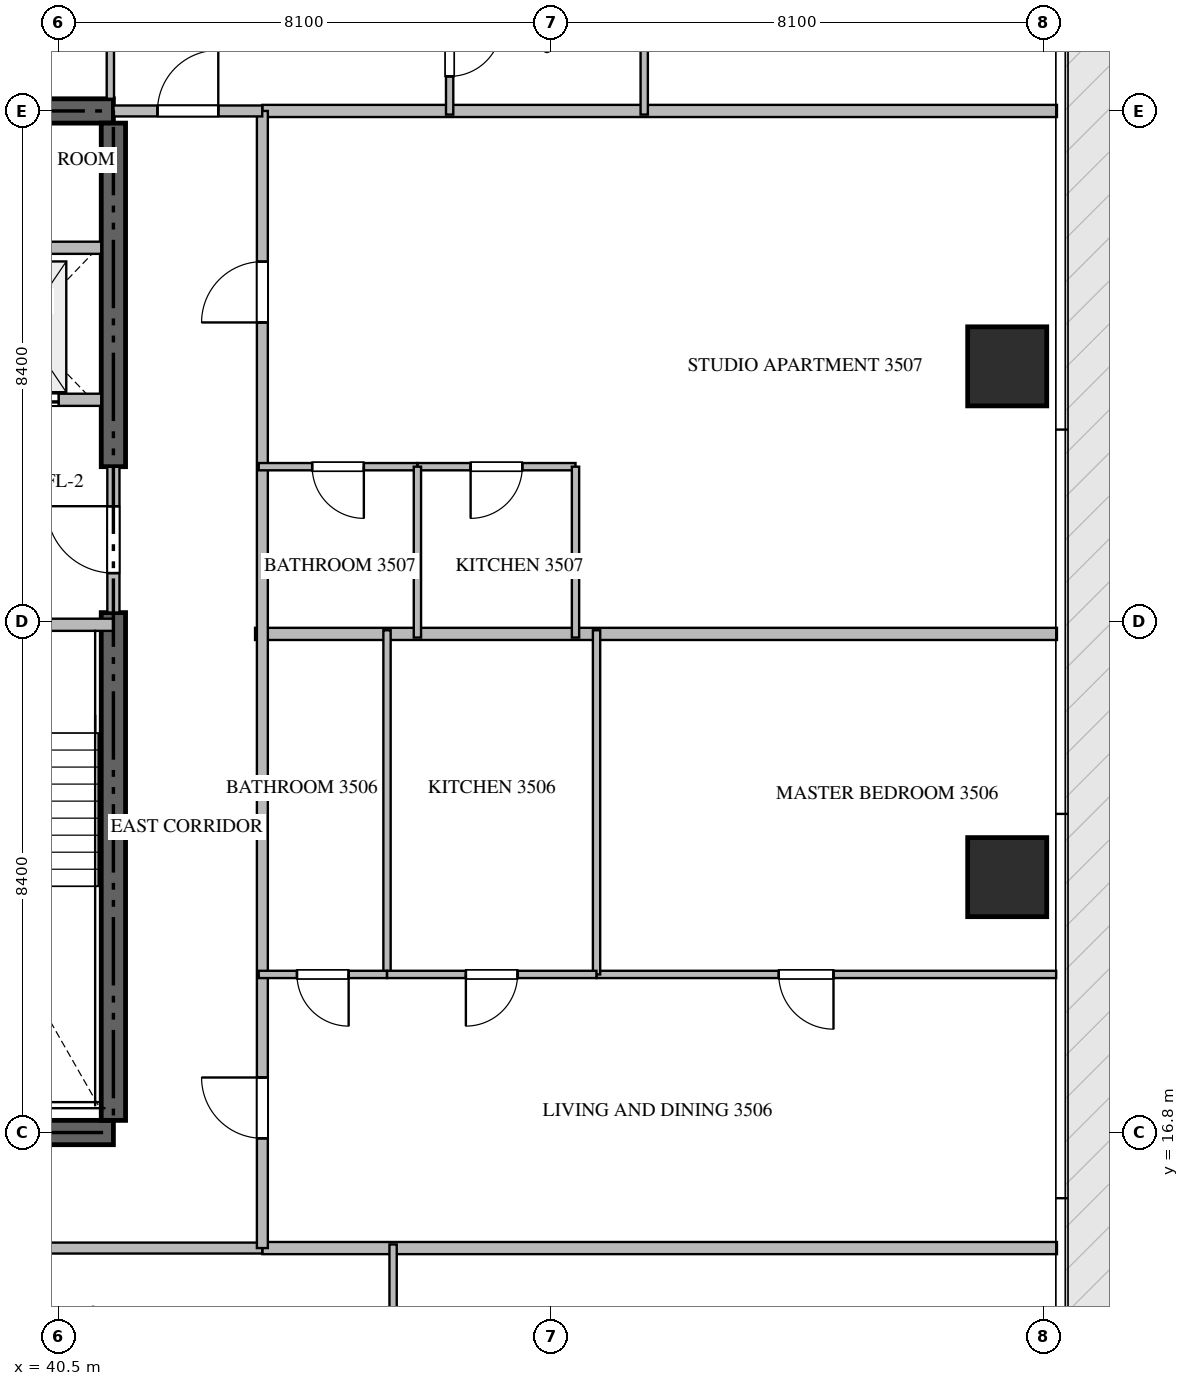
"""IFC4 building model, lengths in metres.
Left out: names, types, materials, properties, quantities, classifications, styles, units other than length and angle.
Written with IfcOpenShell. Run it as: python <this file> out.ifc"""

import sys

from ifc_helpers import new_model, si_unit, direction, frame, frame_2d, origin, origin_2d, place, context, subcontext, project, spatial, rectangle, extrude, source, transform, mapped, element, fill, save


model = new_model("IFC4")
c1 = context("Model", 3, precision=1e-05, world=origin(), true_north=direction((0.0, 1.0)))
c2 = subcontext(c1, "Body", "Model", "MODEL_VIEW")
j1 = project(units=[si_unit("LENGTHUNIT", "METRE"), si_unit("PLANEANGLEUNIT", "RADIAN")], contexts=[c1])
p1 = place(None, origin())
s1 = spatial("IfcSite", under=j1, at=p1, CompositionType="ELEMENT")
p2 = place(p1, origin())
s2 = spatial("IfcBuilding", under=s1, at=p2, CompositionType="ELEMENT")
p3 = place(p2, frame((0.0, 0.0, 142.65)))
s3 = spatial("IfcBuildingStorey", under=s2, at=p3, CompositionType="ELEMENT", Elevation=142.65)
for number, where, z_axis, x_axis in (
    (1, (23.4, 16.8, -0.26), (0.0, 0.0, 1.0), (1.0, 0.0, 0.0)),
    (2, (41.4, 33.6, -0.26), (0.0, 0.0, 1.0), (-1.0, 0.0, 0.0)),
):
    element("IfcWall", number, at=place(p3, frame(where, z_axis=z_axis, x_axis=x_axis)), inside=s3, PredefinedType="SHEAR", context=c2, shape_type="SweptSolid", body=[
        extrude(rectangle(XDim=18.0, YDim=0.4, at=frame_2d((9.0, 0.0))), origin(), (0.0, 0.0, 1.0), 3.748),
    ])
p4 = place(p3, frame((41.4, 17.0, -0.26), z_axis=(0.0, 0.0, 1.0), x_axis=(0.0, 1.0, 0.0)))
e3 = element("IfcWall", 3, at=p4, inside=s3, PredefinedType="SHEAR", context=c2, shape_type="SweptSolid", body=[
    extrude(rectangle(XDim=8.35, YDim=0.4, at=frame_2d((4.175, 0.0))), origin(), (0.0, 0.0, 1.0), 3.748),
])
p5 = place(p3, frame((41.4, 27.75, -0.26), z_axis=(0.0, 0.0, 1.0), x_axis=(0.0, 1.0, 0.0)))
e4 = element("IfcWall", 4, at=p5, inside=s3, PredefinedType="SHEAR", context=c2, shape_type="SweptSolid", body=[
    extrude(rectangle(XDim=5.65, YDim=0.4, at=frame_2d((2.825, 0.0))), origin(), (0.0, 0.0, 1.0), 3.748),
])
m1 = source(origin(), c2, "Body", "SweptSolid", [
    extrude(rectangle(XDim=1.3, YDim=1.3, at=origin_2d()), origin(), (0.0, 0.0, 1.0), 3.75),
])
for number, where, z_axis, x_axis in (
    (5, (56.1, 21.0, -0.26), (0.0, 0.0, 1.0), (1.0, 0.0, 0.0)),
    (6, (56.1, 29.4, -0.26), (0.0, 0.0, 1.0), (1.0, 0.0, 0.0)),
):
    element("IfcColumn", number, at=place(p3, frame(where, z_axis=z_axis, x_axis=x_axis)), inside=s3, PredefinedType="COLUMN", context=c2, shape_type="MappedRepresentation", body=[
        mapped(m1, transform((0.0, 0.0, 0.0), scale=1.0)),
    ])
p6 = place(p3, frame((36.95, 25.15, 0.0), z_axis=(0.0, 0.0, 1.0), x_axis=(1.0, 0.0, 0.0)))
e7 = element("IfcWall", 7, at=p6, inside=s3, PredefinedType="STANDARD", context=c2, shape_type="SweptSolid", body=[
    extrude(rectangle(XDim=4.45, YDim=0.2, at=frame_2d((2.225, 0.0))), origin(), (0.0, 0.0, 1.0), 3.49),
])
p7 = place(p6, frame((1.65, 0.0, 0.0)))
e8 = element("IfcOpeningElement", 8, at=p7, cuts=e7, PredefinedType="OPENING", context=c2, shape_type="SweptSolid", body=[
    extrude(rectangle(XDim=1.1, YDim=2.15, at=frame_2d((0.55, 1.075))), frame((0.0, 0.11, 0.0), z_axis=(0.0, -1.0, 0.0), x_axis=(1.0, 0.0, 0.0)), (0.0, 0.0, 1.0), 0.22),
])
p8 = place(p3, frame((38.75, 28.85, 0.0), z_axis=(0.0, 0.0, 1.0), x_axis=(1.0, 0.0, 0.0)))
e9 = element("IfcWall", 9, at=p8, inside=s3, PredefinedType="STANDARD", context=c2, shape_type="SweptSolid", body=[
    extrude(rectangle(XDim=2.45, YDim=0.2, at=frame_2d((1.225, 0.0))), origin(), (0.0, 0.0, 1.0), 3.49),
])
p9 = place(p8, frame((0.55, 0.0, 0.0)))
e10 = element("IfcOpeningElement", 10, at=p9, cuts=e9, PredefinedType="OPENING", context=c2, shape_type="SweptSolid", body=[
    extrude(rectangle(XDim=1.2, YDim=2.2, at=frame_2d((0.6, 1.1))), frame((0.0, 0.11, 0.0), z_axis=(0.0, -1.0, 0.0), x_axis=(1.0, 0.0, 0.0)), (0.0, 0.0, 1.0), 0.22),
])
p10 = place(p3, frame((38.75, 31.35, 0.0), z_axis=(0.0, 0.0, 1.0), x_axis=(1.0, 0.0, 0.0)))
e11 = element("IfcWall", 11, at=p10, inside=s3, PredefinedType="STANDARD", context=c2, shape_type="SweptSolid", body=[
    extrude(rectangle(XDim=2.45, YDim=0.2, at=frame_2d((1.225, 0.0))), origin(), (0.0, 0.0, 1.0), 3.49),
])
p11 = place(p3, frame((41.4, 25.352, 0.0), z_axis=(0.0, 0.0, 1.0), x_axis=(0.0, 1.0, 0.0)))
e12 = element("IfcWall", 12, at=p11, inside=s3, PredefinedType="STANDARD", context=c2, shape_type="SweptSolid", body=[
    extrude(rectangle(XDim=2.396, YDim=0.2, at=frame_2d((1.198, 0.0))), origin(), (0.0, 0.0, 1.0), 3.49),
])
p12 = place(p11, frame((0.648, 0.0, 0.0)))
e13 = element("IfcOpeningElement", 13, at=p12, cuts=e12, PredefinedType="OPENING", context=c2, shape_type="SweptSolid", body=[
    extrude(rectangle(XDim=1.1, YDim=2.15, at=frame_2d((0.55, 1.075))), frame((0.0, 0.11, 0.0), z_axis=(0.0, -1.0, 0.0), x_axis=(1.0, 0.0, 0.0)), (0.0, 0.0, 1.0), 0.22),
])
p13 = place(p3, frame((43.73, 25.0, 0.0), z_axis=(0.0, 0.0, 1.0), x_axis=(1.0, 0.0, 0.0)))
e14 = element("IfcWall", 14, at=p13, inside=s3, PredefinedType="PARTITIONING", context=c2, shape_type="SweptSolid", body=[
    extrude(rectangle(XDim=13.188, YDim=0.2, at=frame_2d((6.594, 0.0))), origin(), (0.0, 0.0, 1.0), 3.49),
])
for number, where, z_axis, x_axis in (
    (15, (43.85, 14.9, 0.0), (0.0, 0.0, 1.0), (1.0, 0.0, 0.0)),
    (16, (43.85, 33.6, 0.0), (0.0, 0.0, 1.0), (1.0, 0.0, 0.0)),
):
    element("IfcWall", number, at=place(p3, frame(where, z_axis=z_axis, x_axis=x_axis)), inside=s3, PredefinedType="PARTITIONING", context=c2, shape_type="SweptSolid", body=[
        extrude(rectangle(XDim=13.068, YDim=0.2, at=frame_2d((6.534, 0.0))), origin(), (0.0, 0.0, 1.0), 3.49),
    ])
p14 = place(p3, frame((20.952, 14.9, 0.0), z_axis=(0.0, 0.0, 1.0), x_axis=(1.0, 0.0, 0.0)))
e17 = element("IfcWall", 17, at=p14, inside=s3, PredefinedType="PARTITIONING", context=c2, shape_type="SweptSolid", body=[
    extrude(rectangle(XDim=22.896, YDim=0.18, at=frame_2d((11.448, 0.0))), origin(), (0.0, 0.0, 1.0), 3.49),
])
p15 = place(p14, frame((5.386, 0.0, 0.0)))
e18 = element("IfcOpeningElement", 18, at=p15, cuts=e17, PredefinedType="OPENING", context=c2, shape_type="SweptSolid", body=[
    extrude(rectangle(XDim=1.0, YDim=2.15, at=frame_2d((0.5, 1.075))), frame((0.0, 0.1, 0.0), z_axis=(0.0, -1.0, 0.0), x_axis=(1.0, 0.0, 0.0)), (0.0, 0.0, 1.0), 0.2),
])
p16 = place(p14, frame((10.948, 0.0, 0.0)))
e19 = element("IfcOpeningElement", 19, at=p16, cuts=e17, PredefinedType="OPENING", context=c2, shape_type="SweptSolid", body=[
    extrude(rectangle(XDim=1.0, YDim=2.15, at=frame_2d((0.5, 1.075))), frame((0.0, 0.1, 0.0), z_axis=(0.0, -1.0, 0.0), x_axis=(1.0, 0.0, 0.0)), (0.0, 0.0, 1.0), 0.2),
])
p17 = place(p3, frame((43.85, 14.9, 0.0), z_axis=(0.0, 0.0, 1.0), x_axis=(0.0, 1.0, 0.0)))
e20 = element("IfcWall", 20, at=p17, inside=s3, PredefinedType="PARTITIONING", context=c2, shape_type="SweptSolid", body=[
    extrude(rectangle(XDim=18.7, YDim=0.18, at=frame_2d((9.35, 0.0))), origin(), (0.0, 0.0, 1.0), 3.49),
])
p18 = place(p17, frame((1.805, 0.0, 0.0)))
e21 = element("IfcOpeningElement", 21, at=p18, cuts=e20, PredefinedType="OPENING", context=c2, shape_type="SweptSolid", body=[
    extrude(rectangle(XDim=1.0, YDim=2.15, at=frame_2d((0.5, 1.075))), frame((0.0, 0.1, 0.0), z_axis=(0.0, -1.0, 0.0), x_axis=(1.0, 0.0, 0.0)), (0.0, 0.0, 1.0), 0.2),
])
p19 = place(p17, frame((15.222, 0.0, 0.0)))
e22 = element("IfcOpeningElement", 22, at=p19, cuts=e20, PredefinedType="OPENING", context=c2, shape_type="SweptSolid", body=[
    extrude(rectangle(XDim=1.0, YDim=2.15, at=frame_2d((0.5, 1.075))), frame((0.0, 0.1, 0.0), z_axis=(0.0, -1.0, 0.0), x_axis=(1.0, 0.0, 0.0)), (0.0, 0.0, 1.0), 0.2),
])
p20 = place(p3, frame((41.402, 33.6, 0.0), z_axis=(0.0, 0.0, 1.0), x_axis=(1.0, 0.0, 0.0)))
e23 = element("IfcWall", 23, at=p20, inside=s3, PredefinedType="PARTITIONING", context=c2, shape_type="SweptSolid", body=[
    extrude(rectangle(XDim=2.446, YDim=0.18, at=frame_2d((1.223, 0.0))), origin(), (0.0, 0.0, 1.0), 3.49),
])
p21 = place(p20, frame((0.723, 0.0, 0.0)))
e24 = element("IfcOpeningElement", 24, at=p21, cuts=e23, PredefinedType="OPENING", context=c2, shape_type="SweptSolid", body=[
    extrude(rectangle(XDim=1.0, YDim=2.15, at=frame_2d((0.5, 1.075))), frame((0.0, 0.1, 0.0), z_axis=(0.0, -1.0, 0.0), x_axis=(1.0, 0.0, 0.0)), (0.0, 0.0, 1.0), 0.2),
])
p22 = place(p3, frame((46.0, 12.752, 0.0), z_axis=(0.0, 0.0, 1.0), x_axis=(0.0, 1.0, 0.0)))
e25 = element("IfcWall", 25, at=p22, inside=s3, PredefinedType="PARTITIONING", context=c2, shape_type="SweptSolid", body=[
    extrude(rectangle(XDim=2.208, YDim=0.12, at=frame_2d((1.104, 0.0))), origin(), (0.0, 0.0, 1.0), 3.49),
])
p23 = place(p3, frame((41.35, 36.35, 0.0), z_axis=(0.0, 0.0, 1.0), x_axis=(0.0, -1.0, 0.0)))
e26 = element("IfcWall", 26, at=p23, inside=s3, PredefinedType="PARTITIONING", context=c2, shape_type="SweptSolid", body=[
    extrude(rectangle(XDim=2.55, YDim=0.12, at=frame_2d((1.275, 0.0))), origin(), (0.0, 0.0, 1.0), 3.49),
])
p24 = place(p3, frame((50.13, 35.65, 0.0), z_axis=(0.0, 0.0, 1.0), x_axis=(0.0, -1.0, 0.0)))
e27 = element("IfcWall", 27, at=p24, inside=s3, PredefinedType="PARTITIONING", context=c2, shape_type="SweptSolid", body=[
    extrude(rectangle(XDim=2.11, YDim=0.12, at=frame_2d((1.055, 0.0))), origin(), (0.0, 0.0, 1.0), 3.49),
])
p25 = place(p3, frame((46.93, 35.648, 0.0), z_axis=(0.0, 0.0, 1.0), x_axis=(0.0, -1.0, 0.0)))
e28 = element("IfcWall", 28, at=p25, inside=s3, PredefinedType="PARTITIONING", context=c2, shape_type="SweptSolid", body=[
    extrude(rectangle(XDim=2.108, YDim=0.12, at=frame_2d((1.054, 0.0))), origin(), (0.0, 0.0, 1.0), 3.49),
])
p26 = place(p25, frame((0.629, 0.0, 0.0)))
e29 = element("IfcOpeningElement", 29, at=p26, cuts=e28, PredefinedType="OPENING", context=c2, shape_type="SweptSolid", body=[
    extrude(rectangle(XDim=0.85, YDim=2.1, at=frame_2d((0.425, 1.05))), frame((0.0, 0.07, 0.0), z_axis=(0.0, -1.0, 0.0), x_axis=(1.0, 0.0, 0.0)), (0.0, 0.0, 1.0), 0.14),
])
p27 = place(p3, frame((56.905, 19.4, 0.0), z_axis=(0.0, 0.0, 1.0), x_axis=(-1.0, 0.0, 0.0)))
e30 = element("IfcWall", 30, at=p27, inside=s3, PredefinedType="PARTITIONING", context=c2, shape_type="SweptSolid", body=[
    extrude(rectangle(XDim=7.559, YDim=0.12, at=frame_2d((3.78, 0.0))), origin(), (0.0, 0.0, 1.0), 3.49),
])
p28 = place(p27, frame((3.662, 0.0, 0.0)))
e31 = element("IfcOpeningElement", 31, at=p28, cuts=e30, PredefinedType="OPENING", context=c2, shape_type="SweptSolid", body=[
    extrude(rectangle(XDim=0.9, YDim=2.1, at=frame_2d((0.45, 1.05))), frame((0.0, 0.07, 0.0), z_axis=(0.0, -1.0, 0.0), x_axis=(1.0, 0.0, 0.0)), (0.0, 0.0, 1.0), 0.14),
])
for number, where, z_axis, x_axis in (
    (32, (49.346, 19.4, 0.0), (0.0, 0.0, 1.0), (0.0, 1.0, 0.0)),
    (33, (45.9, 19.4, 0.0), (0.0, 0.0, 1.0), (0.0, 1.0, 0.0)),
):
    element("IfcWall", number, at=place(p3, frame(where, z_axis=z_axis, x_axis=x_axis)), inside=s3, PredefinedType="PARTITIONING", context=c2, shape_type="SweptSolid", body=[
        extrude(rectangle(XDim=5.66, YDim=0.12, at=frame_2d((2.83, 0.0))), origin(), (0.0, 0.0, 1.0), 3.49),
    ])
p29 = place(p3, frame((49.344, 19.4, 0.0), z_axis=(0.0, 0.0, 1.0), x_axis=(-1.0, 0.0, 0.0)))
e34 = element("IfcWall", 34, at=p29, inside=s3, PredefinedType="PARTITIONING", context=c2, shape_type="SweptSolid", body=[
    extrude(rectangle(XDim=3.444, YDim=0.12, at=frame_2d((1.722, 0.0))), origin(), (0.0, 0.0, 1.0), 3.49),
])
p30 = place(p29, frame((1.297, 0.0, 0.0)))
e35 = element("IfcOpeningElement", 35, at=p30, cuts=e34, PredefinedType="OPENING", context=c2, shape_type="SweptSolid", body=[
    extrude(rectangle(XDim=0.85, YDim=2.1, at=frame_2d((0.425, 1.05))), frame((0.0, 0.07, 0.0), z_axis=(0.0, -1.0, 0.0), x_axis=(1.0, 0.0, 0.0)), (0.0, 0.0, 1.0), 0.14),
])
p31 = place(p3, frame((45.898, 19.4, 0.0), z_axis=(0.0, 0.0, 1.0), x_axis=(-1.0, 0.0, 0.0)))
e36 = element("IfcWall", 36, at=p31, inside=s3, PredefinedType="PARTITIONING", context=c2, shape_type="SweptSolid", body=[
    extrude(rectangle(XDim=2.108, YDim=0.12, at=frame_2d((1.054, 0.0))), origin(), (0.0, 0.0, 1.0), 3.49),
])
p32 = place(p31, frame((0.629, 0.0, 0.0)))
e37 = element("IfcOpeningElement", 37, at=p32, cuts=e36, PredefinedType="OPENING", context=c2, shape_type="SweptSolid", body=[
    extrude(rectangle(XDim=0.85, YDim=2.1, at=frame_2d((0.425, 1.05))), frame((0.0, 0.07, 0.0), z_axis=(0.0, -1.0, 0.0), x_axis=(1.0, 0.0, 0.0)), (0.0, 0.0, 1.0), 0.14),
])
p33 = place(p3, frame((49.0, 27.75, 0.0), z_axis=(0.0, 0.0, 1.0), x_axis=(-1.0, 0.0, 0.0)))
e38 = element("IfcWall", 38, at=p33, inside=s3, PredefinedType="PARTITIONING", context=c2, shape_type="SweptSolid", body=[
    extrude(rectangle(XDim=2.6, YDim=0.12, at=frame_2d((1.3, 0.0))), origin(), (0.0, 0.0, 1.0), 3.49),
])
p34 = place(p33, frame((0.875, 0.0, 0.0)))
e39 = element("IfcOpeningElement", 39, at=p34, cuts=e38, PredefinedType="OPENING", context=c2, shape_type="SweptSolid", body=[
    extrude(rectangle(XDim=0.85, YDim=2.1, at=frame_2d((0.425, 1.05))), frame((0.0, 0.07, 0.0), z_axis=(0.0, -1.0, 0.0), x_axis=(1.0, 0.0, 0.0)), (0.0, 0.0, 1.0), 0.14),
])
p35 = place(p3, frame((46.398, 27.75, 0.0), z_axis=(0.0, 0.0, 1.0), x_axis=(-1.0, 0.0, 0.0)))
e40 = element("IfcWall", 40, at=p35, inside=s3, PredefinedType="PARTITIONING", context=c2, shape_type="SweptSolid", body=[
    extrude(rectangle(XDim=2.608, YDim=0.12, at=frame_2d((1.304, 0.0))), origin(), (0.0, 0.0, 1.0), 3.49),
])
p36 = place(p35, frame((0.879, 0.0, 0.0)))
e41 = element("IfcOpeningElement", 41, at=p36, cuts=e40, PredefinedType="OPENING", context=c2, shape_type="SweptSolid", body=[
    extrude(rectangle(XDim=0.85, YDim=2.1, at=frame_2d((0.425, 1.05))), frame((0.0, 0.07, 0.0), z_axis=(0.0, -1.0, 0.0), x_axis=(1.0, 0.0, 0.0)), (0.0, 0.0, 1.0), 0.14),
])
for number, where, z_axis, x_axis in (
    (42, (46.4, 24.94, 0.0), (0.0, 0.0, 1.0), (0.0, 1.0, 0.0)),
    (43, (49.0, 24.94, 0.0), (0.0, 0.0, 1.0), (0.0, 1.0, 0.0)),
):
    element("IfcWall", number, at=place(p3, frame(where, z_axis=z_axis, x_axis=x_axis)), inside=s3, PredefinedType="PARTITIONING", context=c2, shape_type="SweptSolid", body=[
        extrude(rectangle(XDim=2.81, YDim=0.12, at=frame_2d((1.405, 0.0))), origin(), (0.0, 0.0, 1.0), 3.49),
    ])
m2 = source(origin(), c2, "Body", "SweptSolid", [
    extrude(rectangle(XDim=1.2, YDim=2.2, at=frame_2d((0.6, 1.1))), frame((0.0, 0.025, 0.0), z_axis=(0.0, -1.0, 0.0), x_axis=(1.0, 0.0, 0.0)), (0.0, 0.0, 1.0), 0.05),
])
p37 = place(p9, origin())
e44 = element("IfcDoor", 44, at=p37, inside=s3, OperationType="DOUBLE_DOOR_SLIDING", PredefinedType="DOOR", context=c2, shape_type="MappedRepresentation", body=[
    mapped(m2, transform((0.0, 0.0, 0.0), scale=1.0)),
])
fill(e10, e44)
m3 = source(origin(), c2, "Body", "SweptSolid", [
    extrude(rectangle(XDim=1.1, YDim=2.15, at=frame_2d((0.55, 1.075))), frame((0.0, 0.025, 0.0), z_axis=(0.0, -1.0, 0.0), x_axis=(1.0, 0.0, 0.0)), (0.0, 0.0, 1.0), 0.05),
])
p38 = place(p12, origin())
e45 = element("IfcDoor", 45, at=p38, inside=s3, OperationType="SINGLE_SWING_RIGHT", PredefinedType="DOOR", context=c2, shape_type="MappedRepresentation", body=[
    mapped(m3, transform((0.0, 0.0, 0.0), scale=1.0)),
])
fill(e13, e45)
m4 = source(origin(), c2, "Body", "SweptSolid", [
    extrude(rectangle(XDim=1.0, YDim=2.15, at=frame_2d((0.5, 1.075))), frame((0.0, 0.025, 0.0), z_axis=(0.0, -1.0, 0.0), x_axis=(1.0, 0.0, 0.0)), (0.0, 0.0, 1.0), 0.05),
])
p39 = place(p18, origin())
e46 = element("IfcDoor", 46, at=p39, inside=s3, OperationType="SINGLE_SWING_RIGHT", PredefinedType="DOOR", context=c2, shape_type="MappedRepresentation", body=[
    mapped(m4, transform((0.0, 0.0, 0.0), scale=1.0)),
])
fill(e21, e46)
p40 = place(p19, origin())
e47 = element("IfcDoor", 47, at=p40, inside=s3, OperationType="SINGLE_SWING_LEFT", PredefinedType="DOOR", context=c2, shape_type="MappedRepresentation", body=[
    mapped(m4, transform((0.0, 0.0, 0.0), scale=1.0)),
])
fill(e22, e47)
p41 = place(p21, origin())
e48 = element("IfcDoor", 48, at=p41, inside=s3, OperationType="SINGLE_SWING_RIGHT", PredefinedType="DOOR", context=c2, shape_type="MappedRepresentation", body=[
    mapped(m4, transform((0.0, 0.0, 0.0), scale=1.0)),
])
fill(e24, e48)
m5 = source(origin(), c2, "Body", "SweptSolid", [
    extrude(rectangle(XDim=0.85, YDim=2.1, at=frame_2d((0.425, 1.05))), frame((0.0, 0.025, 0.0), z_axis=(0.0, -1.0, 0.0), x_axis=(1.0, 0.0, 0.0)), (0.0, 0.0, 1.0), 0.05),
])
p42 = place(p26, origin())
e49 = element("IfcDoor", 49, at=p42, inside=s3, OperationType="SINGLE_SWING_LEFT", PredefinedType="DOOR", context=c2, shape_type="MappedRepresentation", body=[
    mapped(m5, transform((0.0, 0.0, 0.0), scale=1.0)),
])
fill(e29, e49)
m6 = source(origin(), c2, "Body", "SweptSolid", [
    extrude(rectangle(XDim=0.9, YDim=2.1, at=frame_2d((0.45, 1.05))), frame((0.0, 0.025, 0.0), z_axis=(0.0, -1.0, 0.0), x_axis=(1.0, 0.0, 0.0)), (0.0, 0.0, 1.0), 0.05),
])
p43 = place(p28, origin())
e50 = element("IfcDoor", 50, at=p43, inside=s3, OperationType="SINGLE_SWING_LEFT", PredefinedType="DOOR", context=c2, shape_type="MappedRepresentation", body=[
    mapped(m6, transform((0.0, 0.0, 0.0), scale=1.0)),
])
fill(e31, e50)
p44 = place(p30, origin())
e51 = element("IfcDoor", 51, at=p44, inside=s3, OperationType="SINGLE_SWING_RIGHT", PredefinedType="DOOR", context=c2, shape_type="MappedRepresentation", body=[
    mapped(m5, transform((0.0, 0.0, 0.0), scale=1.0)),
])
fill(e35, e51)
p45 = place(p32, origin())
e52 = element("IfcDoor", 52, at=p45, inside=s3, OperationType="SINGLE_SWING_LEFT", PredefinedType="DOOR", context=c2, shape_type="MappedRepresentation", body=[
    mapped(m5, transform((0.0, 0.0, 0.0), scale=1.0)),
])
fill(e37, e52)
p46 = place(p34, origin())
e53 = element("IfcDoor", 53, at=p46, inside=s3, OperationType="SINGLE_SWING_RIGHT", PredefinedType="DOOR", context=c2, shape_type="MappedRepresentation", body=[
    mapped(m5, transform((0.0, 0.0, 0.0), scale=1.0)),
])
fill(e39, e53)
p47 = place(p36, origin())
e54 = element("IfcDoor", 54, at=p47, inside=s3, OperationType="SINGLE_SWING_LEFT", PredefinedType="DOOR", context=c2, shape_type="MappedRepresentation", body=[
    mapped(m5, transform((0.0, 0.0, 0.0), scale=1.0)),
])
fill(e41, e54)
save(model, sys.argv[1])
